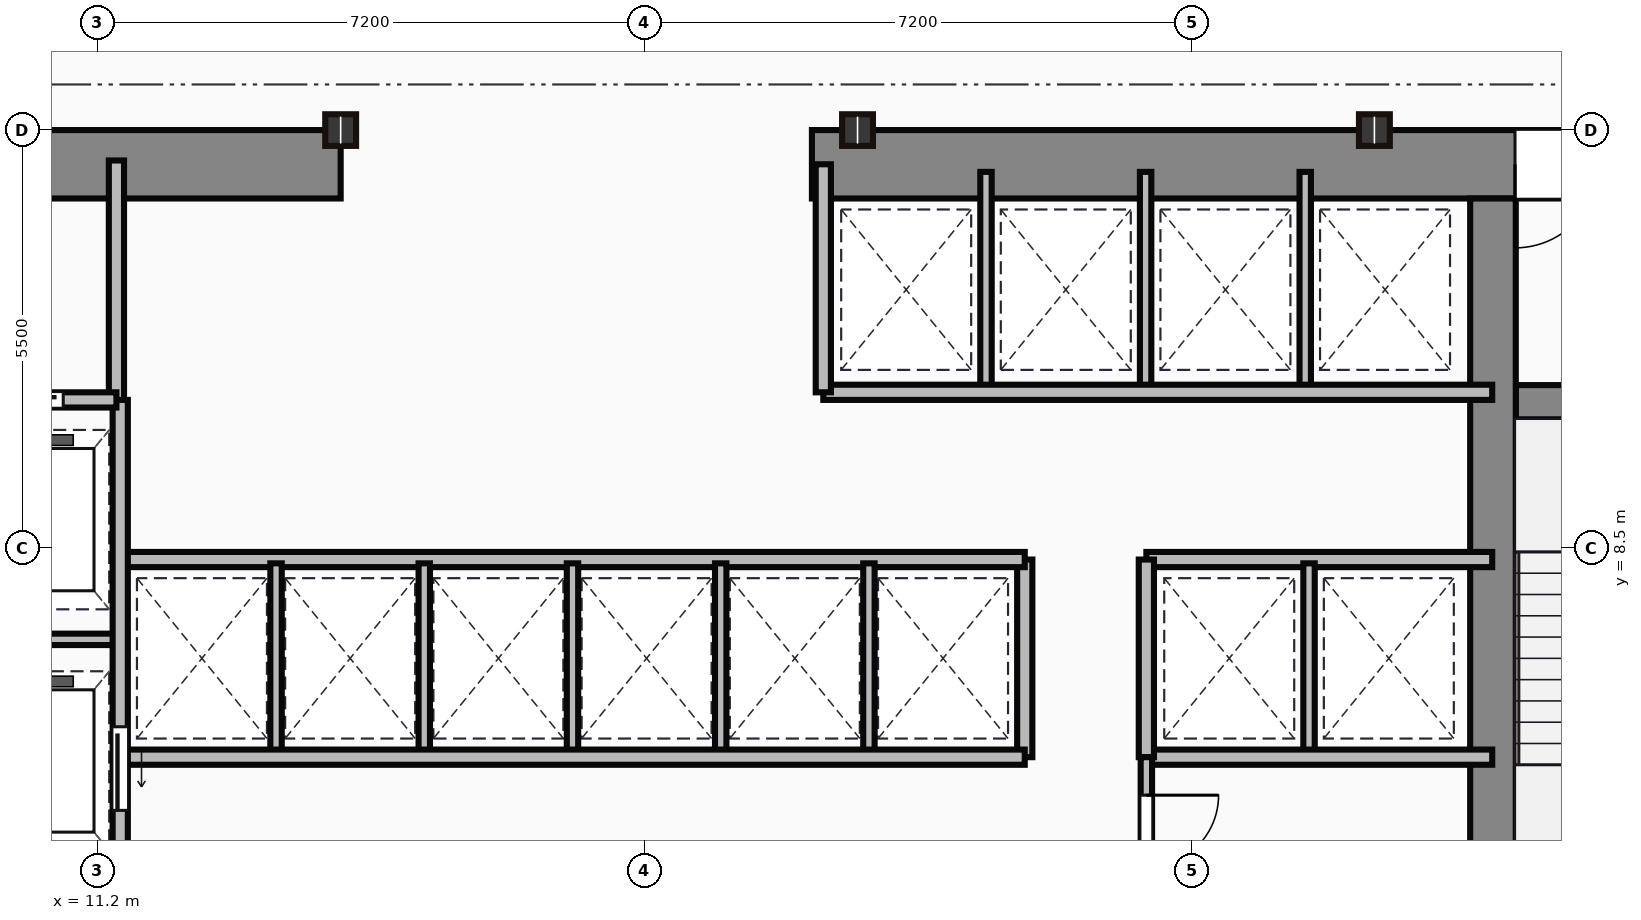
"""IFC4 building model, lengths in metres.
Left out: names, types, materials, properties, quantities, classifications, styles, units other than length and angle.
Written with IfcOpenShell. Run it as: python <this file> out.ifc"""

import sys

from ifc_helpers import new_model, si_unit, direction, frame, frame_2d, origin, origin_2d, place, context, subcontext, project, spatial, rectangle, i_section, extrude, source, transform, mapped, element, fill, save


model = new_model("IFC4")
c1 = context("Model", 3, precision=1e-05, world=origin(), true_north=direction((0.0, 1.0)))
c2 = subcontext(c1, "Body", "Model", "MODEL_VIEW")
j1 = project(units=[si_unit("LENGTHUNIT", "METRE"), si_unit("PLANEANGLEUNIT", "RADIAN")], contexts=[c1])
p1 = place(None, origin())
s1 = spatial("IfcSite", under=j1, at=p1, CompositionType="ELEMENT")
p2 = place(p1, origin())
s2 = spatial("IfcBuilding", under=s1, at=p2, CompositionType="ELEMENT")
p3 = place(p2, frame((0.0, 0.0, 76.3)))
s3 = spatial("IfcBuildingStorey", under=s2, at=p3, CompositionType="ELEMENT", Elevation=76.3)
m1 = source(origin(), c2, "Body", "SweptSolid", [
    extrude(rectangle(XDim=9.1, YDim=0.9, at=frame_2d((4.55, 0.0))), origin(), (0.0, 0.0, 1.0), 3.65),
])
p4 = place(p3, frame((5.3, 13.55, 0.0), z_axis=(0.0, 0.0, 1.0), x_axis=(1.0, 0.0, 0.0)))
e1 = element("IfcWall", 1, at=p4, inside=s3, PredefinedType="SHEAR", context=c2, shape_type="MappedRepresentation", body=[
    mapped(m1, transform((0.0, 0.0, 0.0))),
])
p5 = place(p4, frame((4.1, 0.0, 0.0)))
e2 = element("IfcOpeningElement", 2, at=p5, cuts=e1, PredefinedType="OPENING", context=c2, shape_type="SweptSolid", body=[
    extrude(rectangle(XDim=1.1, YDim=2.15, at=frame_2d((0.55, 1.075))), frame((0.0, 0.46, 0.0), z_axis=(0.0, -1.0, 0.0), x_axis=(1.0, 0.0, 0.0)), (0.0, 0.0, 1.0), 0.92),
])
m2 = source(origin(), c2, "Body", "SweptSolid", [
    extrude(rectangle(XDim=12.6, YDim=0.9, at=frame_2d((6.3, 0.0))), origin(), (0.0, 0.0, 1.0), 3.65),
])
p6 = place(p3, frame((20.6, 13.55, 0.0), z_axis=(0.0, 0.0, 1.0), x_axis=(1.0, 0.0, 0.0)))
e3 = element("IfcWall", 3, at=p6, inside=s3, PredefinedType="SHEAR", context=c2, shape_type="MappedRepresentation", body=[
    mapped(m2, transform((0.0, 0.0, 0.0))),
])
p7 = place(p6, frame((9.25, 0.0, 0.0)))
e4 = element("IfcOpeningElement", 4, at=p7, cuts=e3, PredefinedType="OPENING", context=c2, shape_type="SweptSolid", body=[
    extrude(rectangle(XDim=1.1, YDim=2.15, at=frame_2d((0.55, 1.075))), frame((0.0, 0.46, 0.0), z_axis=(0.0, -1.0, 0.0), x_axis=(1.0, 0.0, 0.0)), (0.0, 0.0, 1.0), 0.92),
])
m3 = source(origin(), c2, "Body", "SweptSolid", [
    extrude(rectangle(XDim=12.2, YDim=0.6, at=frame_2d((6.1, 0.0))), origin(), (0.0, 0.0, 1.0), 3.65),
])
p8 = place(p3, frame((29.56, 0.9, 0.0), z_axis=(0.0, 0.0, 1.0), x_axis=(0.0, 1.0, 0.0)))
e5 = element("IfcWall", 5, at=p8, inside=s3, PredefinedType="SHEAR", context=c2, shape_type="MappedRepresentation", body=[
    mapped(m3, transform((0.0, 0.0, 0.0))),
])
m4 = source(origin(), c2, "Body", "SweptSolid", [
    extrude(rectangle(XDim=3.39, YDim=0.45, at=frame_2d((1.695, 0.0))), origin(), (0.0, 0.0, 1.0), 3.65),
])
p9 = place(p3, frame((29.86, 10.42, 0.0), z_axis=(0.0, 0.0, 1.0), x_axis=(1.0, 0.0, 0.0)))
e6 = element("IfcWall", 6, at=p9, inside=s3, PredefinedType="SHEAR", context=c2, shape_type="MappedRepresentation", body=[
    mapped(m4, transform((0.0, 0.0, 0.0))),
])
p10 = place(p9, frame((1.1, 0.0, 0.0)))
e7 = element("IfcOpeningElement", 7, at=p10, cuts=e6, PredefinedType="OPENING", context=c2, shape_type="SweptSolid", body=[
    extrude(rectangle(XDim=1.1, YDim=2.15, at=frame_2d((0.55, 1.075))), frame((0.0, 0.235, 0.0), z_axis=(0.0, -1.0, 0.0), x_axis=(1.0, 0.0, 0.0)), (0.0, 0.0, 1.0), 0.47),
])
m5 = source(origin(), c2, "Body", "SweptSolid", [
    extrude(i_section(OverallWidth=0.406, OverallDepth=0.416, WebThickness=0.03, FlangeThickness=0.048, at=origin_2d()), origin(), (0.0, 0.0, 1.0), 3.65),
])
for number, where, z_axis, x_axis in (
    (8, (14.4, 14.0, 0.0), (0.0, 0.0, 1.0), (1.0, 0.0, 0.0)),
    (9, (21.2, 14.0, 0.0), (0.0, 0.0, 1.0), (1.0, 0.0, 0.0)),
    (10, (28.0, 14.0, 0.0), (0.0, 0.0, 1.0), (1.0, 0.0, 0.0)),
):
    element("IfcColumn", number, at=place(p3, frame(where, z_axis=z_axis, x_axis=x_axis)), inside=s3, PredefinedType="COLUMN", context=c2, shape_type="MappedRepresentation", body=[
        mapped(m5, transform((0.0, 0.0, 0.0))),
    ])
m6 = source(origin(), c2, "Body", "SweptSolid", [
    extrude(rectangle(XDim=3.18, YDim=0.2, at=frame_2d((1.59, 0.0))), origin(), (0.0, 0.0, 1.0), 3.4),
])
p11 = place(p3, frame((11.45, 10.42, 0.0), z_axis=(0.0, 0.0, 1.0), x_axis=(0.0, 1.0, 0.0)))
e11 = element("IfcWall", 11, at=p11, inside=s3, PredefinedType="PARTITIONING", context=c2, shape_type="MappedRepresentation", body=[
    mapped(m6, transform((0.0, 0.0, 0.0))),
])
m7 = source(origin(), c2, "Body", "SweptSolid", [
    extrude(rectangle(XDim=2.35, YDim=0.2, at=frame_2d((1.175, 0.0))), origin(), (0.0, 0.0, 1.0), 3.4),
])
p12 = place(p3, frame((9.1, 10.45, 0.0), z_axis=(0.0, 0.0, 1.0), x_axis=(1.0, 0.0, 0.0)))
e12 = element("IfcWall", 12, at=p12, inside=s3, PredefinedType="PARTITIONING", context=c2, shape_type="MappedRepresentation", body=[
    mapped(m7, transform((0.0, 0.0, 0.0))),
])
p13 = place(p12, frame((0.55, 0.0, 0.0)))
e13 = element("IfcOpeningElement", 13, at=p13, cuts=e12, PredefinedType="OPENING", context=c2, shape_type="SweptSolid", body=[
    extrude(rectangle(XDim=1.1, YDim=2.15, at=frame_2d((0.55, 1.075))), frame((0.0, 0.11, 0.0), z_axis=(0.0, -1.0, 0.0), x_axis=(1.0, 0.0, 0.0)), (0.0, 0.0, 1.0), 0.22),
])
m8 = source(origin(), c2, "Body", "SweptSolid", [
    extrude(rectangle(XDim=9.6, YDim=0.2, at=frame_2d((4.8, 0.0))), origin(), (0.0, 0.0, 1.0), 3.4),
])
p14 = place(p3, frame((11.5, 0.85, 0.0), z_axis=(0.0, 0.0, 1.0), x_axis=(0.0, 1.0, 0.0)))
e14 = element("IfcWall", 14, at=p14, inside=s3, PredefinedType="PARTITIONING", context=c2, shape_type="MappedRepresentation", body=[
    mapped(m8, transform((0.0, 0.0, 0.0))),
])
p15 = place(p14, frame((4.2, 0.0, 0.0)))
e15 = element("IfcOpeningElement", 15, at=p15, cuts=e14, PredefinedType="OPENING", context=c2, shape_type="SweptSolid", body=[
    extrude(rectangle(XDim=1.1, YDim=2.15, at=frame_2d((0.55, 1.075))), frame((0.0, 0.11, 0.0), z_axis=(0.0, -1.0, 0.0), x_axis=(1.0, 0.0, 0.0)), (0.0, 0.0, 1.0), 0.22),
])
p16 = place(p14, frame((0.9, 0.0, 0.0)))
e16 = element("IfcOpeningElement", 16, at=p16, cuts=e14, PredefinedType="OPENING", context=c2, shape_type="SweptSolid", body=[
    extrude(rectangle(XDim=1.2, YDim=2.15, at=frame_2d((0.6, 1.075))), frame((0.0, 0.11, 0.0), z_axis=(0.0, -1.0, 0.0), x_axis=(1.0, 0.0, 0.0)), (0.0, 0.0, 1.0), 0.22),
])
m9 = source(origin(), c2, "Body", "SweptSolid", [
    extrude(rectangle(XDim=2.4, YDim=0.15, at=frame_2d((1.2, 0.0))), origin(), (0.0, 0.0, 1.0), 3.4),
])
p17 = place(p3, frame((9.1, 7.3, 0.0), z_axis=(0.0, 0.0, 1.0), x_axis=(1.0, 0.0, 0.0)))
e17 = element("IfcWall", 17, at=p17, inside=s3, PredefinedType="PARTITIONING", context=c2, shape_type="MappedRepresentation", body=[
    mapped(m9, transform((0.0, 0.0, 0.0))),
])
m10 = source(origin(), c2, "Body", "SweptSolid", [
    extrude(rectangle(XDim=11.85, YDim=0.2, at=frame_2d((5.925, 0.0))), origin(), (0.0, 0.0, 1.0), 3.4),
])
for number, where, z_axis, x_axis in (
    (18, (11.55, 5.75, 0.0), (0.0, 0.0, 1.0), (1.0, 0.0, 0.0)),
    (19, (11.55, 8.35, 0.0), (0.0, 0.0, 1.0), (1.0, 0.0, 0.0)),
):
    element("IfcWall", number, at=place(p3, frame(where, z_axis=z_axis, x_axis=x_axis)), inside=s3, PredefinedType="PARTITIONING", context=c2, shape_type="MappedRepresentation", body=[
        mapped(m10, transform((0.0, 0.0, 0.0))),
    ])
m11 = source(origin(), c2, "Body", "SweptSolid", [
    extrude(rectangle(XDim=2.6, YDim=0.2, at=frame_2d((1.3, 0.0))), origin(), (0.0, 0.0, 1.0), 3.4),
])
p18 = place(p3, frame((23.4, 5.75, 0.0), z_axis=(0.0, 0.0, 1.0), x_axis=(0.0, 1.0, 0.0)))
e20 = element("IfcWall", 20, at=p18, inside=s3, PredefinedType="PARTITIONING", context=c2, shape_type="MappedRepresentation", body=[
    mapped(m11, transform((0.0, 0.0, 0.0))),
])
m12 = source(origin(), c2, "Body", "SweptSolid", [
    extrude(rectangle(XDim=2.5, YDim=0.15, at=frame_2d((1.25, 0.0))), origin(), (0.0, 0.0, 1.0), 3.4),
])
for number, where, z_axis, x_axis in (
    (21, (13.55, 5.8, 0.0), (0.0, 0.0, 1.0), (0.0, 1.0, 0.0)),
    (22, (15.5, 5.8, 0.0), (0.0, 0.0, 1.0), (0.0, 1.0, 0.0)),
    (23, (17.45, 5.8, 0.0), (0.0, 0.0, 1.0), (0.0, 1.0, 0.0)),
    (24, (19.4, 5.8, 0.0), (0.0, 0.0, 1.0), (0.0, 1.0, 0.0)),
    (25, (21.35, 5.8, 0.0), (0.0, 0.0, 1.0), (0.0, 1.0, 0.0)),
):
    element("IfcWall", number, at=place(p3, frame(where, z_axis=z_axis, x_axis=x_axis)), inside=s3, PredefinedType="PARTITIONING", context=c2, shape_type="MappedRepresentation", body=[
        mapped(m12, transform((0.0, 0.0, 0.0))),
    ])
m13 = source(origin(), c2, "Body", "SweptSolid", [
    extrude(rectangle(XDim=8.8, YDim=0.2, at=frame_2d((4.4, 0.0))), origin(), (0.0, 0.0, 1.0), 3.4),
])
p19 = place(p3, frame((20.75, 10.55, 0.0), z_axis=(0.0, 0.0, 1.0), x_axis=(1.0, 0.0, 0.0)))
e26 = element("IfcWall", 26, at=p19, inside=s3, PredefinedType="PARTITIONING", context=c2, shape_type="MappedRepresentation", body=[
    mapped(m13, transform((0.0, 0.0, 0.0))),
])
m14 = source(origin(), c2, "Body", "SweptSolid", [
    extrude(rectangle(XDim=3.0, YDim=0.2, at=frame_2d((1.5, 0.0))), origin(), (0.0, 0.0, 1.0), 3.4),
])
p20 = place(p3, frame((20.75, 10.55, 0.0), z_axis=(0.0, 0.0, 1.0), x_axis=(0.0, 1.0, 0.0)))
e27 = element("IfcWall", 27, at=p20, inside=s3, PredefinedType="PARTITIONING", context=c2, shape_type="MappedRepresentation", body=[
    mapped(m14, transform((0.0, 0.0, 0.0))),
])
m15 = source(origin(), c2, "Body", "SweptSolid", [
    extrude(rectangle(XDim=2.85, YDim=0.15, at=frame_2d((1.425, 0.0))), origin(), (0.0, 0.0, 1.0), 3.4),
])
for number, where, z_axis, x_axis in (
    (28, (22.89, 10.6, 0.0), (0.0, 0.0, 1.0), (0.0, 1.0, 0.0)),
    (29, (24.99, 10.6, 0.0), (0.0, 0.0, 1.0), (0.0, 1.0, 0.0)),
    (30, (27.09, 10.6, 0.0), (0.0, 0.0, 1.0), (0.0, 1.0, 0.0)),
):
    element("IfcWall", number, at=place(p3, frame(where, z_axis=z_axis, x_axis=x_axis)), inside=s3, PredefinedType="PARTITIONING", context=c2, shape_type="MappedRepresentation", body=[
        mapped(m15, transform((0.0, 0.0, 0.0))),
    ])
m16 = source(origin(), c2, "Body", "SweptSolid", [
    extrude(rectangle(XDim=4.55, YDim=0.2, at=frame_2d((2.275, 0.0))), origin(), (0.0, 0.0, 1.0), 3.4),
])
for number, where, z_axis, x_axis in (
    (31, (25.0, 8.35, 0.0), (0.0, 0.0, 1.0), (1.0, 0.0, 0.0)),
    (32, (25.0, 5.75, 0.0), (0.0, 0.0, 1.0), (1.0, 0.0, 0.0)),
):
    element("IfcWall", number, at=place(p3, frame(where, z_axis=z_axis, x_axis=x_axis)), inside=s3, PredefinedType="PARTITIONING", context=c2, shape_type="MappedRepresentation", body=[
        mapped(m16, transform((0.0, 0.0, 0.0))),
    ])
p21 = place(p3, frame((25.0, 5.75, 0.0), z_axis=(0.0, 0.0, 1.0), x_axis=(0.0, 1.0, 0.0)))
e33 = element("IfcWall", 33, at=p21, inside=s3, PredefinedType="PARTITIONING", context=c2, shape_type="MappedRepresentation", body=[
    mapped(m11, transform((0.0, 0.0, 0.0))),
])
p22 = place(p3, frame((27.14, 5.8, 0.0), z_axis=(0.0, 0.0, 1.0), x_axis=(0.0, 1.0, 0.0)))
e34 = element("IfcWall", 34, at=p22, inside=s3, PredefinedType="PARTITIONING", context=c2, shape_type="MappedRepresentation", body=[
    mapped(m12, transform((0.0, 0.0, 0.0))),
])
m17 = source(origin(), c2, "Body", "SweptSolid", [
    extrude(rectangle(XDim=4.9, YDim=0.15, at=frame_2d((2.45, 0.0))), origin(), (0.0, 0.0, 1.0), 3.4),
])
p23 = place(p3, frame((25.0, 0.85, 0.0), z_axis=(0.0, 0.0, 1.0), x_axis=(0.0, 1.0, 0.0)))
e35 = element("IfcWall", 35, at=p23, inside=s3, PredefinedType="PARTITIONING", context=c2, shape_type="MappedRepresentation", body=[
    mapped(m17, transform((0.0, 0.0, 0.0))),
])
p24 = place(p23, frame((1.8, 0.0, 0.0)))
e36 = element("IfcOpeningElement", 36, at=p24, cuts=e35, PredefinedType="OPENING", context=c2, shape_type="SweptSolid", body=[
    extrude(rectangle(XDim=0.95, YDim=2.15, at=frame_2d((0.475, 1.075))), frame((0.0, 0.085, 0.0), z_axis=(0.0, -1.0, 0.0), x_axis=(1.0, 0.0, 0.0)), (0.0, 0.0, 1.0), 0.17),
])
p25 = place(p23, frame((3.45, 0.0, 0.0)))
e37 = element("IfcOpeningElement", 37, at=p25, cuts=e35, PredefinedType="OPENING", context=c2, shape_type="SweptSolid", body=[
    extrude(rectangle(XDim=0.95, YDim=2.15, at=frame_2d((0.475, 1.075))), frame((0.0, 0.085, 0.0), z_axis=(0.0, -1.0, 0.0), x_axis=(1.0, 0.0, 0.0)), (0.0, 0.0, 1.0), 0.17),
])
m18 = source(origin(), c2, "Body", "SweptSolid", [
    extrude(rectangle(XDim=1.1, YDim=2.15, at=frame_2d((0.55, 1.075))), frame((0.0, 0.025, 0.0), z_axis=(0.0, -1.0, 0.0), x_axis=(1.0, 0.0, 0.0)), (0.0, 0.0, 1.0), 0.05),
])
p26 = place(p7, origin())
e38 = element("IfcDoor", 38, at=p26, inside=s3, OperationType="SINGLE_SWING_LEFT", PredefinedType="DOOR", context=c2, shape_type="MappedRepresentation", body=[
    mapped(m18, transform((0.0, 0.0, 0.0))),
])
fill(e4, e38)
p27 = place(p13, origin())
e39 = element("IfcDoor", 39, at=p27, inside=s3, OperationType="SLIDING_TO_LEFT", PredefinedType="DOOR", context=c2, shape_type="MappedRepresentation", body=[
    mapped(m18, transform((0.0, 0.0, 0.0))),
])
fill(e13, e39)
p28 = place(p15, frame((1.1, 0.0, 0.0), z_axis=(0.0, 0.0, 1.0), x_axis=(-1.0, 0.0, 0.0)))
e40 = element("IfcDoor", 40, at=p28, inside=s3, OperationType="SLIDING_TO_LEFT", PredefinedType="DOOR", context=c2, shape_type="MappedRepresentation", body=[
    mapped(m18, transform((0.0, 0.0, 0.0))),
])
fill(e15, e40)
m19 = source(origin(), c2, "Body", "SweptSolid", [
    extrude(rectangle(XDim=0.95, YDim=2.15, at=frame_2d((0.475, 1.075))), frame((0.0, 0.025, 0.0), z_axis=(0.0, -1.0, 0.0), x_axis=(1.0, 0.0, 0.0)), (0.0, 0.0, 1.0), 0.05),
])
p29 = place(p25, origin())
e41 = element("IfcDoor", 41, at=p29, inside=s3, OperationType="SINGLE_SWING_RIGHT", PredefinedType="DOOR", context=c2, shape_type="MappedRepresentation", body=[
    mapped(m19, transform((0.0, 0.0, 0.0))),
])
fill(e37, e41)
save(model, sys.argv[1])
